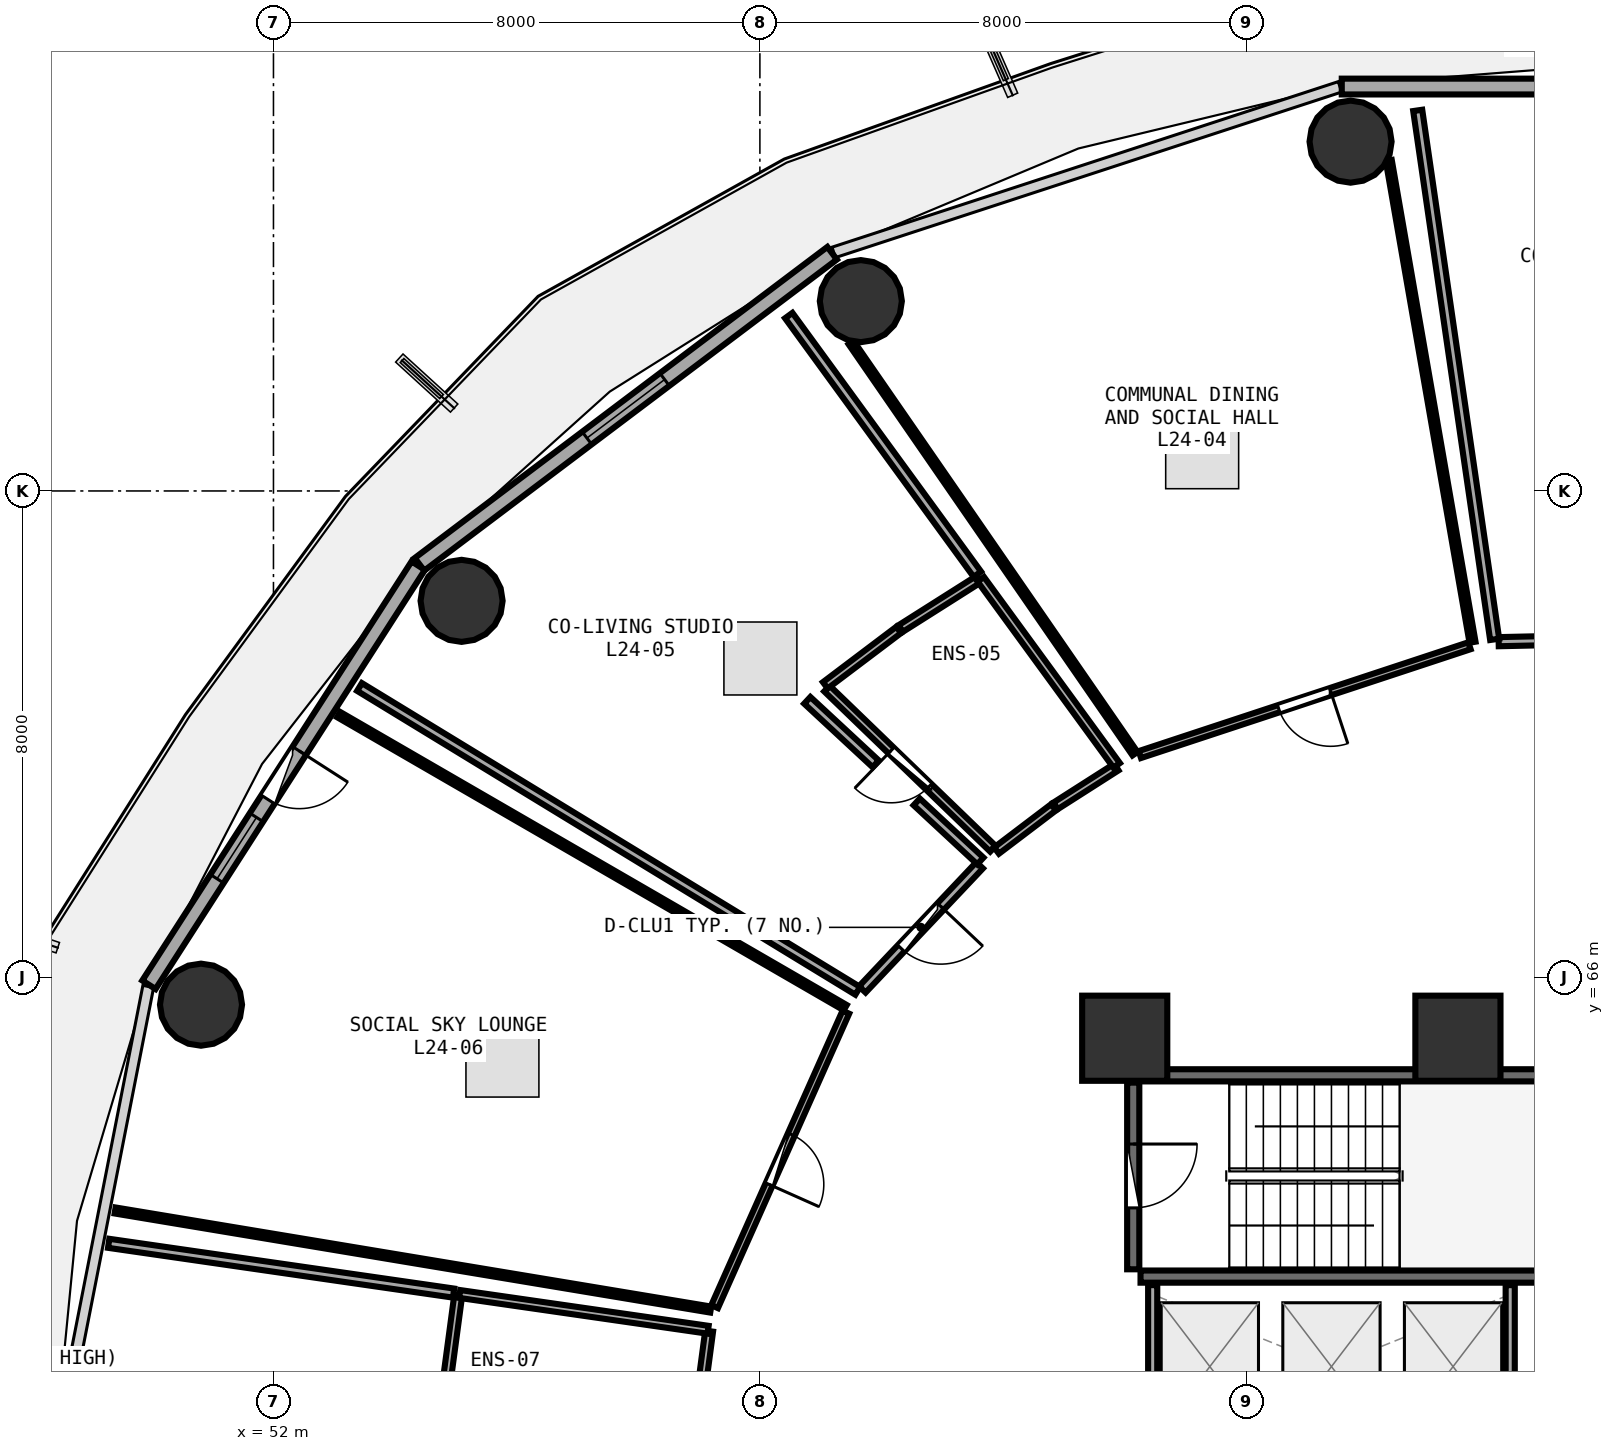
"""IFC4 building model, lengths in metres.
Left out: names, types, materials, properties, quantities, classifications, styles, units other than length and angle.
Written with IfcOpenShell. Run it as: python <this file> out.ifc"""

import sys

from ifc_helpers import new_model, si_unit, direction, frame, frame_2d, origin, origin_2d, place, context, subcontext, project, spatial, rectangle, circle, extrude, element, fill, save


model = new_model("IFC4")
c1 = context("Model", 3, precision=1e-05, world=origin(), true_north=direction((0.0, 1.0)))
c2 = subcontext(c1, "Body", "Model", "MODEL_VIEW")
j1 = project(units=[si_unit("LENGTHUNIT", "METRE"), si_unit("PLANEANGLEUNIT", "RADIAN")], contexts=[c1])
p1 = place(None, origin())
s1 = spatial("IfcSite", under=j1, at=p1, CompositionType="ELEMENT")
p2 = place(p1, origin())
s2 = spatial("IfcBuilding", under=s1, at=p2, CompositionType="ELEMENT")
p3 = place(p2, frame((0.0, 0.0, 95.1)))
s3 = spatial("IfcBuildingStorey", under=s2, at=p3, CompositionType="ELEMENT", Elevation=95.1)
for number, where, z_axis, x_axis in (
    (1, (71.48, 65.0, 0.0), (0.0, 0.0, 1.0), (1.0, 0.0, 0.0)),
    (2, (66.0, 65.0, 0.0), (0.0, 0.0, 1.0), (1.0, 0.0, 0.0)),
):
    element("IfcColumn", number, at=place(p3, frame(where, z_axis=z_axis, x_axis=x_axis)), inside=s3, PredefinedType="PILASTER", context=c2, shape_type="SweptSolid", body=[
        extrude(rectangle(XDim=1.4, YDim=1.4, at=origin_2d()), origin(), (0.0, 0.0, 1.0), 3.75),
    ])
for number, where, z_axis, x_axis in (
    (3, (69.714, 79.745, 0.0), (0.0, 0.0, 1.0), (1.0, 0.0, 0.0)),
    (4, (61.66, 77.122, 0.0), (0.0, 0.0, 1.0), (1.0, 0.0, 0.0)),
    (5, (55.094, 72.193, 0.0), (0.0, 0.0, 1.0), (1.0, 0.0, 0.0)),
    (6, (50.808, 65.552, 0.0), (0.0, 0.0, 1.0), (1.0, 0.0, 0.0)),
):
    element("IfcColumn", number, at=place(p3, frame(where, z_axis=z_axis, x_axis=x_axis)), inside=s3, PredefinedType="COLUMN", context=c2, shape_type="SweptSolid", body=[
        extrude(circle(Radius=0.675, at=origin_2d()), origin(), (0.0, 0.0, 1.0), 3.75),
    ])
p4 = place(p3, frame((78.43, 80.651, 0.0), z_axis=(0.0, 0.0, 1.0), x_axis=(-1.0, 0.0, 0.0)))
e7 = element("IfcWall", 7, at=p4, inside=s3, PredefinedType="SOLIDWALL", context=c2, shape_type="SweptSolid", body=[
    extrude(rectangle(XDim=8.861, YDim=0.26, at=frame_2d((4.43, 0.0))), origin(), (0.0, 0.0, 1.0), 3.475),
])
p5 = place(p4, frame((3.63, 0.0, 0.85)))
e8 = element("IfcOpeningElement", 8, at=p5, cuts=e7, PredefinedType="OPENING", context=c2, shape_type="SweptSolid", body=[
    extrude(rectangle(XDim=1.6, YDim=1.45, at=frame_2d((0.8, 0.725))), frame((0.0, 0.14, 0.0), z_axis=(0.0, -1.0, 0.0), x_axis=(1.0, 0.0, 0.0)), (0.0, 0.0, 1.0), 0.28),
])
p6 = place(p3, frame((61.188, 77.91, 0.0), z_axis=(0.0, 0.0, 1.0), x_axis=(-0.798501507879, -0.601992808857, 0.0)))
e9 = element("IfcWall", 9, at=p6, inside=s3, PredefinedType="SOLIDWALL", context=c2, shape_type="SweptSolid", body=[
    extrude(rectangle(XDim=8.499, YDim=0.26, at=frame_2d((4.25, 0.0))), origin(), (0.0, 0.0, 1.0), 3.475),
])
p7 = place(p6, frame((3.45, 0.0, 0.85)))
e10 = element("IfcOpeningElement", 10, at=p7, cuts=e9, PredefinedType="OPENING", context=c2, shape_type="SweptSolid", body=[
    extrude(rectangle(XDim=1.6, YDim=1.45, at=frame_2d((0.8, 0.725))), frame((0.0, 0.14, 0.0), z_axis=(0.0, -1.0, 0.0), x_axis=(1.0, 0.0, 0.0)), (0.0, 0.0, 1.0), 0.28),
])
p8 = place(p3, frame((54.381, 72.771, 0.0), z_axis=(0.0, 0.0, 1.0), x_axis=(-0.540620528459, -0.841266571432, 0.0)))
e11 = element("IfcWall", 11, at=p8, inside=s3, PredefinedType="SOLIDWALL", context=c2, shape_type="SweptSolid", body=[
    extrude(rectangle(XDim=8.193, YDim=0.26, at=frame_2d((4.096, 0.0))), origin(), (0.0, 0.0, 1.0), 3.475),
])
p9 = place(p8, frame((3.621, 0.0, 0.0)))
e12 = element("IfcOpeningElement", 12, at=p9, cuts=e11, PredefinedType="OPENING", context=c2, shape_type="SweptSolid", body=[
    extrude(rectangle(XDim=0.95, YDim=2.1, at=frame_2d((0.475, 1.05))), frame((0.0, 0.14, 0.0), z_axis=(0.0, -1.0, 0.0), x_axis=(1.0, 0.0, 0.0)), (0.0, 0.0, 1.0), 0.28),
])
p10 = place(p8, frame((4.921, 0.0, 0.85)))
e13 = element("IfcOpeningElement", 13, at=p10, cuts=e11, PredefinedType="OPENING", context=c2, shape_type="SweptSolid", body=[
    extrude(rectangle(XDim=1.2, YDim=1.45, at=frame_2d((0.6, 0.725))), frame((0.0, 0.14, 0.0), z_axis=(0.0, -1.0, 0.0), x_axis=(1.0, 0.0, 0.0)), (0.0, 0.0, 1.0), 0.28),
])
for number, where, z_axis, x_axis in (
    (14, (66.26, 61.08, 0.0), (0.0, 0.0, 1.0), (1.0, 0.0, 0.0)),
    (15, (73.42, 64.39, 0.0), (0.0, 0.0, 1.0), (-1.0, 0.0, 0.0)),
):
    element("IfcWall", number, at=place(p3, frame(where, z_axis=z_axis, x_axis=x_axis)), inside=s3, PredefinedType="SHEAR", context=c2, shape_type="SweptSolid", body=[
        extrude(rectangle(XDim=7.16, YDim=0.2, at=frame_2d((3.58, 0.0))), origin(), (0.0, 0.0, 1.0), 3.49),
    ])
p11 = place(p3, frame((66.14, 64.27, 0.0), z_axis=(0.0, 0.0, 1.0), x_axis=(0.0, -1.0, 0.0)))
e16 = element("IfcWall", 16, at=p11, inside=s3, PredefinedType="SHEAR", context=c2, shape_type="SweptSolid", body=[
    extrude(rectangle(XDim=3.07, YDim=0.2, at=frame_2d((1.535, 0.0))), origin(), (0.0, 0.0, 1.0), 3.49),
])
p12 = place(p11, frame((1.01, 0.0, 0.0)))
e17 = element("IfcOpeningElement", 17, at=p12, cuts=e16, PredefinedType="OPENING", context=c2, shape_type="SweptSolid", body=[
    extrude(rectangle(XDim=1.05, YDim=2.1, at=frame_2d((0.525, 1.05))), frame((0.0, 0.11, 0.0), z_axis=(0.0, -1.0, 0.0), x_axis=(1.0, 0.0, 0.0)), (0.0, 0.0, 1.0), 0.22),
])
for number, where, z_axis, x_axis in (
    (18, (66.46, 58.48, 0.0), (0.0, 0.0, 1.0), (0.0, 1.0, 0.0)),
    (19, (72.34, 58.48, 0.0), (0.0, 0.0, 1.0), (0.0, 1.0, 0.0)),
):
    element("IfcWall", number, at=place(p3, frame(where, z_axis=z_axis, x_axis=x_axis)), inside=s3, PredefinedType="PARTITIONING", context=c2, shape_type="SweptSolid", body=[
        extrude(rectangle(XDim=2.46, YDim=0.15, at=frame_2d((1.23, 0.0))), origin(), (0.0, 0.0, 1.0), 3.48),
    ])
p13 = place(p3, frame((75.121, 71.587, 0.0), z_axis=(0.0, 0.0, 1.0), x_axis=(-0.999757617916, -0.022016026426, 0.0)))
e20 = element("IfcWall", 20, at=p13, inside=s3, PredefinedType="PARTITIONING", context=c2, shape_type="SweptSolid", body=[
    extrude(rectangle(XDim=2.972, YDim=0.15, at=frame_2d((1.486, 0.0))), origin(), (0.0, 0.0, 1.0), 3.48),
])
p14 = place(p13, frame((1.011, 0.0, 0.0)))
e21 = element("IfcOpeningElement", 21, at=p14, cuts=e20, PredefinedType="OPENING", context=c2, shape_type="SweptSolid", body=[
    extrude(rectangle(XDim=0.95, YDim=2.08, at=frame_2d((0.475, 1.04))), frame((0.0, 0.085, 0.0), z_axis=(0.0, -1.0, 0.0), x_axis=(1.0, 0.0, 0.0)), (0.0, 0.0, 1.0), 0.17),
])
p15 = place(p3, frame((71.67, 71.454, 0.0), z_axis=(0.0, 0.0, 1.0), x_axis=(-0.949607265123, -0.313442246716, 0.0)))
e22 = element("IfcWall", 22, at=p15, inside=s3, PredefinedType="PARTITIONING", context=c2, shape_type="SweptSolid", body=[
    extrude(rectangle(XDim=5.708, YDim=0.12, at=frame_2d((2.854, 0.0))), origin(), (0.0, 0.0, 1.0), 2.925),
])
p16 = place(p15, frame((2.404, 0.0, 0.0)))
e23 = element("IfcOpeningElement", 23, at=p16, cuts=e22, PredefinedType="OPENING", context=c2, shape_type="SweptSolid", body=[
    extrude(rectangle(XDim=0.9, YDim=2.08, at=frame_2d((0.45, 1.04))), frame((0.0, 0.07, 0.0), z_axis=(0.0, -1.0, 0.0), x_axis=(1.0, 0.0, 0.0)), (0.0, 0.0, 1.0), 0.14),
])
p17 = place(p3, frame((63.833, 68.116, 0.0), z_axis=(0.0, 0.0, 1.0), x_axis=(-0.719513452588, 0.694478503299, 0.0)))
e24 = element("IfcWall", 24, at=p17, inside=s3, PredefinedType="PLUMBINGWALL", context=c2, shape_type="SweptSolid", body=[
    extrude(rectangle(XDim=3.793, YDim=0.13, at=frame_2d((1.897, 0.0))), origin(), (0.0, 0.0, 1.0), 3.175),
])
p18 = place(p17, frame((1.467, 0.0, 0.0)))
e25 = element("IfcOpeningElement", 25, at=p18, cuts=e24, PredefinedType="OPENING", context=c2, shape_type="SweptSolid", body=[
    extrude(rectangle(XDim=0.86, YDim=2.05, at=frame_2d((0.43, 1.025))), frame((0.0, 0.075, 0.0), z_axis=(0.0, -1.0, 0.0), x_axis=(1.0, 0.0, 0.0)), (0.0, 0.0, 1.0), 0.15),
])
p19 = place(p3, frame((63.614, 67.844, 0.0), z_axis=(0.0, 0.0, 1.0), x_axis=(-0.68683784084, -0.726810690889, 0.0)))
e26 = element("IfcWall", 26, at=p19, inside=s3, PredefinedType="PARTITIONING", context=c2, shape_type="SweptSolid", body=[
    extrude(rectangle(XDim=2.81, YDim=0.15, at=frame_2d((1.405, 0.0))), origin(), (0.0, 0.0, 1.0), 2.925),
])
p20 = place(p19, frame((0.93, 0.0, 0.0)))
e27 = element("IfcOpeningElement", 27, at=p20, cuts=e26, PredefinedType="OPENING", context=c2, shape_type="SweptSolid", body=[
    extrude(rectangle(XDim=0.95, YDim=2.08, at=frame_2d((0.475, 1.04))), frame((0.0, 0.085, 0.0), z_axis=(0.0, -1.0, 0.0), x_axis=(1.0, 0.0, 0.0)), (0.0, 0.0, 1.0), 0.17),
])
p21 = place(p3, frame((61.414, 65.428, 0.0), z_axis=(0.0, 0.0, 1.0), x_axis=(-0.407078232177, -0.913393295841, 0.0)))
e28 = element("IfcWall", 28, at=p21, inside=s3, PredefinedType="PARTITIONING", context=c2, shape_type="SweptSolid", body=[
    extrude(rectangle(XDim=5.302, YDim=0.12, at=frame_2d((2.651, 0.0))), origin(), (0.0, 0.0, 1.0), 2.925),
])
p22 = place(p21, frame((2.201, 0.0, 0.0)))
e29 = element("IfcOpeningElement", 29, at=p22, cuts=e28, PredefinedType="OPENING", context=c2, shape_type="SweptSolid", body=[
    extrude(rectangle(XDim=0.9, YDim=2.08, at=frame_2d((0.45, 1.04))), frame((0.0, 0.07, 0.0), z_axis=(0.0, -1.0, 0.0), x_axis=(1.0, 0.0, 0.0)), (0.0, 0.0, 1.0), 0.14),
])
p23 = place(p3, frame((72.084, 71.56, 0.0), z_axis=(0.0, 0.0, 1.0), x_axis=(-0.143952208647, 0.989584640961, 0.0)))
e30 = element("IfcWall", 30, at=p23, inside=s3, PredefinedType="PARTITIONING", context=c2, shape_type="SweptSolid", body=[
    extrude(rectangle(XDim=8.79, YDim=0.15, at=frame_2d((4.395, 0.0))), origin(), (0.0, 0.0, 1.0), 2.975),
])
p24 = place(p3, frame((66.169, 69.679, 0.0), z_axis=(0.0, 0.0, 1.0), x_axis=(-0.568250117639, 0.822855882766, 0.0)))
e31 = element("IfcWall", 31, at=p24, inside=s3, PredefinedType="PARTITIONING", context=c2, shape_type="SweptSolid", body=[
    extrude(rectangle(XDim=8.217, YDim=0.1, at=frame_2d((4.108, 0.0))), origin(), (0.0, 0.0, 1.0), 2.925),
])
p25 = place(p3, frame((70.343, 79.436, 0.0), z_axis=(0.0, 0.0, 1.0), x_axis=(0.171306583965, -0.985217769983, 0.0)))
e32 = element("IfcWall", 32, at=p25, inside=s3, PredefinedType="PARTITIONING", context=c2, shape_type="SweptSolid", body=[
    extrude(rectangle(XDim=8.042, YDim=0.1, at=frame_2d((4.021, 0.0))), origin(), (0.0, 0.0, 1.0), 3.175),
])
p26 = place(p3, frame((65.863, 69.459, 0.0), z_axis=(0.0, 0.0, 1.0), x_axis=(-0.842932135958, -0.538019901276, 0.0)))
e33 = element("IfcWall", 33, at=p26, inside=s3, PredefinedType="PLUMBINGWALL", context=c2, shape_type="SweptSolid", body=[
    extrude(rectangle(XDim=1.187, YDim=0.13, at=frame_2d((0.593, 0.0))), origin(), (0.0, 0.0, 1.0), 3.48),
])
p27 = place(p3, frame((64.83, 68.798, 0.0), z_axis=(0.0, 0.0, 1.0), x_axis=(-0.796729134499, -0.604336567022, 0.0)))
e34 = element("IfcWall", 34, at=p27, inside=s3, PredefinedType="PLUMBINGWALL", context=c2, shape_type="SweptSolid", body=[
    extrude(rectangle(XDim=1.177, YDim=0.13, at=frame_2d((0.589, 0.0))), origin(), (0.0, 0.0, 1.0), 2.925),
])
p28 = place(p3, frame((61.076, 70.804, 0.0), z_axis=(0.0, 0.0, 1.0), x_axis=(0.798136421733, 0.602476764949, 0.0)))
e35 = element("IfcWall", 35, at=p28, inside=s3, PredefinedType="PLUMBINGWALL", context=c2, shape_type="SweptSolid", body=[
    extrude(rectangle(XDim=1.512, YDim=0.13, at=frame_2d((0.756, 0.0))), origin(), (0.0, 0.0, 1.0), 3.48),
])
p29 = place(p3, frame((62.316, 71.738, 0.0), z_axis=(0.0, 0.0, 1.0), x_axis=(0.844925229622, 0.534884432703, 0.0)))
e36 = element("IfcWall", 36, at=p29, inside=s3, PredefinedType="PLUMBINGWALL", context=c2, shape_type="SweptSolid", body=[
    extrude(rectangle(XDim=1.524, YDim=0.13, at=frame_2d((0.762, 0.0))), origin(), (0.0, 0.0, 1.0), 2.925),
])
p30 = place(p3, frame((63.633, 72.548, 0.0), z_axis=(0.0, 0.0, 1.0), x_axis=(0.589656455867, -0.807654173551, 0.0)))
e37 = element("IfcWall", 37, at=p30, inside=s3, PredefinedType="PLUMBINGWALL", context=c2, shape_type="SweptSolid", body=[
    extrude(rectangle(XDim=3.791, YDim=0.13, at=frame_2d((1.896, 0.0))), origin(), (0.0, 0.0, 1.0), 3.175),
])
p31 = place(p3, frame((61.609, 65.78, 0.0), z_axis=(0.0, 0.0, 1.0), x_axis=(-0.853785143599, 0.520625516634, 0.0)))
e38 = element("IfcWall", 38, at=p31, inside=s3, PredefinedType="PARTITIONING", context=c2, shape_type="SweptSolid", body=[
    extrude(rectangle(XDim=9.597, YDim=0.15, at=frame_2d((4.798, 0.0))), origin(), (0.0, 0.0, 1.0), 2.975),
])
p32 = place(p3, frame((60.475, 76.885, 0.0), z_axis=(0.0, 0.0, 1.0), x_axis=(0.589128007392, -0.808039721119, 0.0)))
e39 = element("IfcWall", 39, at=p32, inside=s3, PredefinedType="PARTITIONING", context=c2, shape_type="SweptSolid", body=[
    extrude(rectangle(XDim=5.265, YDim=0.15, at=frame_2d((2.633, 0.0))), origin(), (0.0, 0.0, 1.0), 2.925),
])
p33 = place(p3, frame((60.779, 70.557, 0.0), z_axis=(0.0, 0.0, 1.0), x_axis=(0.732929378099, -0.680304730778, 0.0)))
e40 = element("IfcWall", 40, at=p33, inside=s3, PredefinedType="PARTITIONING", context=c2, shape_type="SweptSolid", body=[
    extrude(rectangle(XDim=1.536, YDim=0.15, at=frame_2d((0.768, 0.0))), origin(), (0.0, 0.0, 1.0), 3.175),
])
p34 = place(p3, frame((62.579, 68.886, 0.0), z_axis=(0.0, 0.0, 1.0), x_axis=(0.733037104662, -0.680188652646, 0.0)))
e41 = element("IfcWall", 41, at=p34, inside=s3, PredefinedType="PARTITIONING", context=c2, shape_type="SweptSolid", body=[
    extrude(rectangle(XDim=1.427, YDim=0.15, at=frame_2d((0.714, 0.0))), origin(), (0.0, 0.0, 1.0), 3.235),
])
p35 = place(p3, frame((59.191, 60.538, 0.0), z_axis=(0.0, 0.0, 1.0), x_axis=(-0.986439069388, 0.16412788424, 0.0)))
e42 = element("IfcWall", 42, at=p35, inside=s3, PredefinedType="PARTITIONING", context=c2, shape_type="SweptSolid", body=[
    extrude(rectangle(XDim=9.931, YDim=0.1, at=frame_2d((4.965, 0.0))), origin(), (0.0, 0.0, 1.0), 2.975),
])
p36 = place(p3, frame((53.073, 70.322, 0.0), z_axis=(0.0, 0.0, 1.0), x_axis=(0.865606852524, -0.500724252322, 0.0)))
e43 = element("IfcWall", 43, at=p36, inside=s3, PredefinedType="PARTITIONING", context=c2, shape_type="SweptSolid", body=[
    extrude(rectangle(XDim=9.624, YDim=0.1, at=frame_2d((4.812, 0.0))), origin(), (0.0, 0.0, 1.0), 2.975),
])
p37 = place(p3, frame((59.165, 60.183, 0.0), z_axis=(0.0, 0.0, 1.0), x_axis=(-0.132293485363, -0.991210590001, 0.0)))
e44 = element("IfcWall", 44, at=p37, inside=s3, PredefinedType="PLUMBINGWALL", context=c2, shape_type="SweptSolid", body=[
    extrude(rectangle(XDim=1.109, YDim=0.13, at=frame_2d((0.555, 0.0))), origin(), (0.0, 0.0, 1.0), 3.48),
])
p38 = place(p3, frame((54.851, 59.371, 0.0), z_axis=(0.0, 0.0, 1.0), x_axis=(0.133008986947, 0.991114831587, 0.0)))
e45 = element("IfcWall", 45, at=p38, inside=s3, PredefinedType="PLUMBINGWALL", context=c2, shape_type="SweptSolid", body=[
    extrude(rectangle(XDim=1.419, YDim=0.13, at=frame_2d((0.709, 0.0))), origin(), (0.0, 0.0, 1.0), 3.48),
])
p39 = place(p3, frame((55.062, 60.794, 0.0), z_axis=(0.0, 0.0, 1.0), x_axis=(0.989792775484, -0.142514075094, 0.0)))
e46 = element("IfcWall", 46, at=p39, inside=s3, PredefinedType="PLUMBINGWALL", context=c2, shape_type="SweptSolid", body=[
    extrude(rectangle(XDim=4.129, YDim=0.13, at=frame_2d((2.064, 0.0))), origin(), (0.0, 0.0, 1.0), 3.175),
])
p40 = place(p3, frame((49.29, 61.627, 0.0), z_axis=(0.0, 0.0, 1.0), x_axis=(0.989748303042, -0.142822605444, 0.0)))
e47 = element("IfcWall", 47, at=p40, inside=s3, PredefinedType="PARTITIONING", context=c2, shape_type="SweptSolid", body=[
    extrude(rectangle(XDim=5.732, YDim=0.15, at=frame_2d((2.866, 0.0))), origin(), (0.0, 0.0, 1.0), 2.975),
])
p41 = place(p7, origin())
e48 = element("IfcWindow", 48, at=p41, inside=s3, PartitioningType="SINGLE_PANEL", PredefinedType="WINDOW", context=c2, shape_type="SweptSolid", body=[
    extrude(rectangle(XDim=1.6, YDim=1.45, at=frame_2d((0.8, 0.725))), frame((0.0, 0.03, 0.0), z_axis=(0.0, -1.0, 0.0), x_axis=(1.0, 0.0, 0.0)), (0.0, 0.0, 1.0), 0.06),
])
fill(e10, e48)
p42 = place(p9, frame((0.95, 0.0, 0.0), z_axis=(0.0, 0.0, 1.0), x_axis=(-1.0, 0.0, 0.0)))
e49 = element("IfcDoor", 49, at=p42, inside=s3, OperationType="SINGLE_SWING_RIGHT", PredefinedType="DOOR", context=c2, shape_type="SweptSolid", body=[
    extrude(rectangle(XDim=0.95, YDim=2.1, at=frame_2d((0.475, 1.05))), frame((0.0, 0.025, 0.0), z_axis=(0.0, -1.0, 0.0), x_axis=(1.0, 0.0, 0.0)), (0.0, 0.0, 1.0), 0.05),
])
fill(e12, e49)
p43 = place(p10, origin())
e50 = element("IfcWindow", 50, at=p43, inside=s3, PartitioningType="SINGLE_PANEL", PredefinedType="WINDOW", context=c2, shape_type="SweptSolid", body=[
    extrude(rectangle(XDim=1.2, YDim=1.45, at=frame_2d((0.6, 0.725))), frame((0.0, 0.03, 0.0), z_axis=(0.0, -1.0, 0.0), x_axis=(1.0, 0.0, 0.0)), (0.0, 0.0, 1.0), 0.06),
])
fill(e13, e50)
p44 = place(p12, origin())
e51 = element("IfcDoor", 51, at=p44, inside=s3, OperationType="SINGLE_SWING_LEFT", PredefinedType="DOOR", context=c2, shape_type="SweptSolid", body=[
    extrude(rectangle(XDim=1.05, YDim=2.1, at=frame_2d((0.525, 1.05))), frame((0.0, 0.025, 0.0), z_axis=(0.0, -1.0, 0.0), x_axis=(1.0, 0.0, 0.0)), (0.0, 0.0, 1.0), 0.05),
])
fill(e17, e51)
p45 = place(p16, origin())
e52 = element("IfcDoor", 52, at=p45, inside=s3, OperationType="SINGLE_SWING_LEFT", PredefinedType="DOOR", context=c2, shape_type="SweptSolid", body=[
    extrude(rectangle(XDim=0.9, YDim=2.08, at=frame_2d((0.45, 1.04))), frame((0.0, 0.025, 0.0), z_axis=(0.0, -1.0, 0.0), x_axis=(1.0, 0.0, 0.0)), (0.0, 0.0, 1.0), 0.05),
])
fill(e23, e52)
p46 = place(p18, origin())
e53 = element("IfcDoor", 53, at=p46, inside=s3, OperationType="SINGLE_SWING_RIGHT", PredefinedType="DOOR", context=c2, shape_type="SweptSolid", body=[
    extrude(rectangle(XDim=0.86, YDim=2.05, at=frame_2d((0.43, 1.025))), frame((0.0, 0.025, 0.0), z_axis=(0.0, -1.0, 0.0), x_axis=(1.0, 0.0, 0.0)), (0.0, 0.0, 1.0), 0.05),
])
fill(e25, e53)
p47 = place(p20, origin())
e54 = element("IfcDoor", 54, at=p47, inside=s3, OperationType="SINGLE_SWING_LEFT", PredefinedType="DOOR", context=c2, shape_type="SweptSolid", body=[
    extrude(rectangle(XDim=0.95, YDim=2.08, at=frame_2d((0.475, 1.04))), frame((0.0, 0.025, 0.0), z_axis=(0.0, -1.0, 0.0), x_axis=(1.0, 0.0, 0.0)), (0.0, 0.0, 1.0), 0.05),
])
fill(e27, e54)
p48 = place(p22, origin())
e55 = element("IfcDoor", 55, at=p48, inside=s3, OperationType="SINGLE_SWING_RIGHT", PredefinedType="DOOR", context=c2, shape_type="SweptSolid", body=[
    extrude(rectangle(XDim=0.9, YDim=2.08, at=frame_2d((0.45, 1.04))), frame((0.0, 0.025, 0.0), z_axis=(0.0, -1.0, 0.0), x_axis=(1.0, 0.0, 0.0)), (0.0, 0.0, 1.0), 0.05),
])
fill(e29, e55)
save(model, sys.argv[1])
